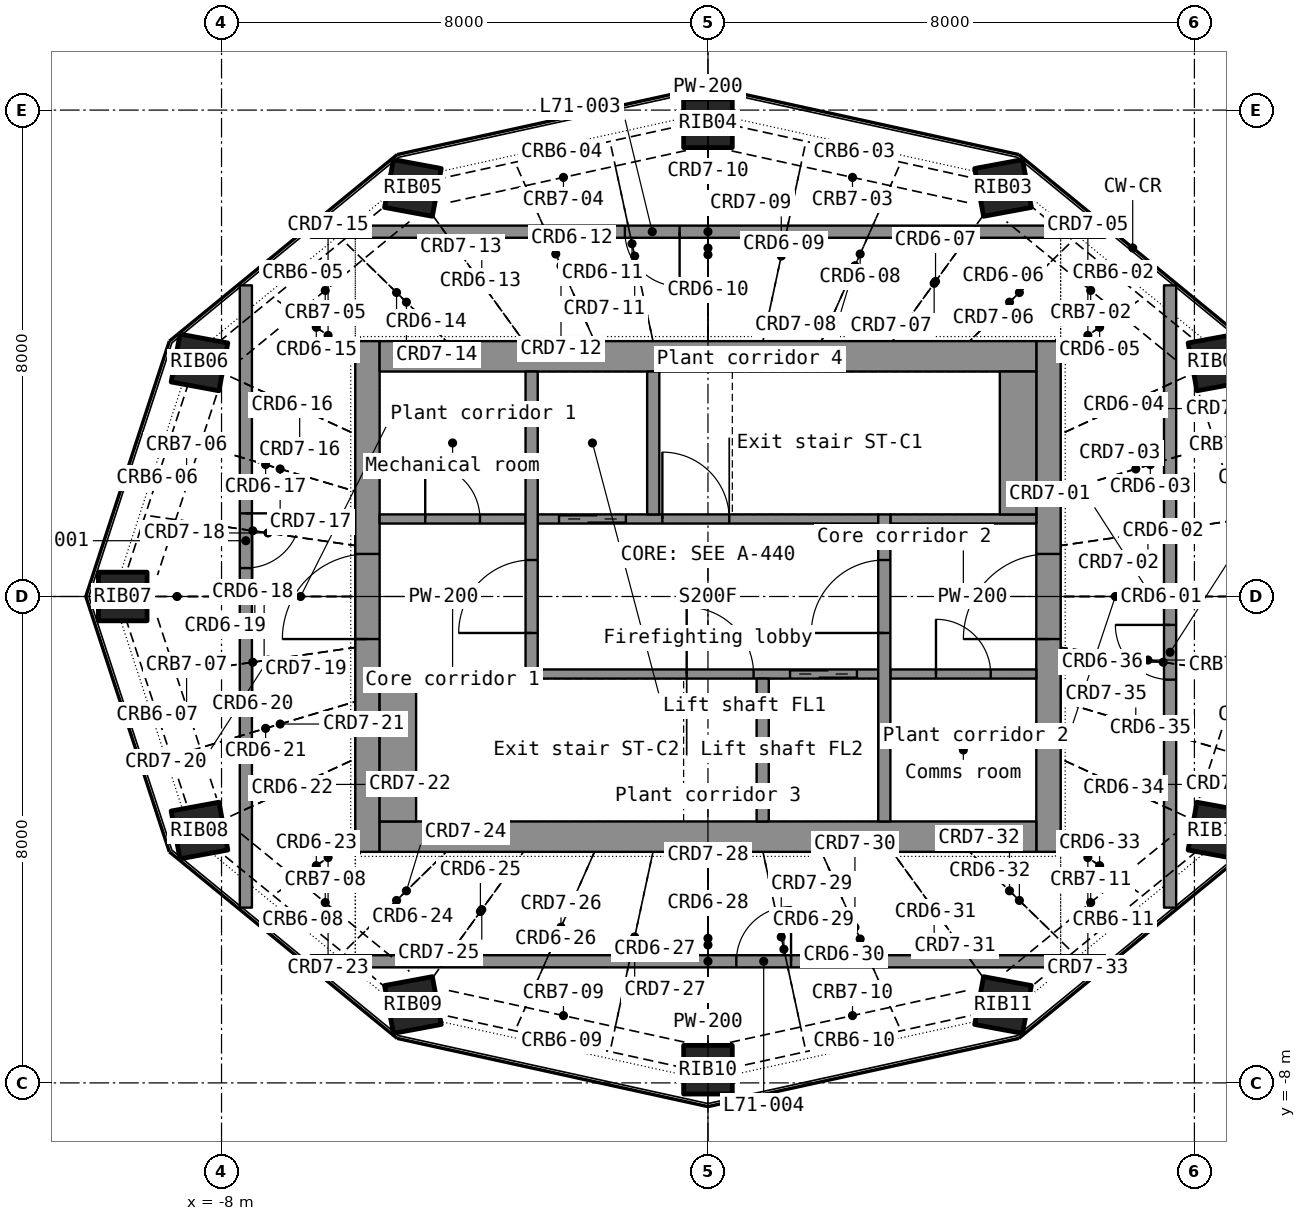
"""IFC4 building model, lengths in metres.
Left out: names, types, materials, properties, quantities, classifications, styles, units other than length and angle.
Written with IfcOpenShell. Run it as: python <this file> out.ifc"""

import sys

from ifc_helpers import new_model, si_unit, direction, frame, frame_2d, origin, origin_2d, place, context, subcontext, project, spatial, rectangle, hollow_rectangle, extrude, element, fill, save


model = new_model("IFC4")
c1 = context("Model", 3, precision=1e-05, world=origin(), true_north=direction((0.0, 1.0)))
c2 = subcontext(c1, "Body", "Model", "MODEL_VIEW")
j1 = project(units=[si_unit("LENGTHUNIT", "METRE"), si_unit("PLANEANGLEUNIT", "RADIAN")], contexts=[c1])
p1 = place(None, origin())
s1 = spatial("IfcSite", under=j1, at=p1, CompositionType="ELEMENT")
p2 = place(p1, origin())
s2 = spatial("IfcBuilding", under=s1, at=p2, CompositionType="ELEMENT")
p3 = place(p2, frame((0.0, 0.0, 292.1)))
s3 = spatial("IfcBuildingStorey", under=s2, at=p3, CompositionType="ELEMENT", Elevation=292.1)
p4 = place(p3, frame((8.362, 3.849, 0.0), z_axis=(-0.119034705, -0.054800649, 0.991376633), x_axis=(0.574755771, -0.817978965, 0.023795301)))
e1 = element("IfcColumn", 1, at=p4, inside=s3, PredefinedType="COLUMN", context=c2, shape_type="SweptSolid", body=[
    extrude(hollow_rectangle(XDim=0.8, YDim=0.8, WallThickness=0.025, at=origin_2d()), origin(), (0.0, 0.0, 1.0), 3.934),
])
p5 = place(p3, frame((4.853, 6.719, 0.0), z_axis=(-0.069187562, -0.095793381, 0.992993811), x_axis=(0.903250872, -0.428569359, 0.021590888)))
e2 = element("IfcColumn", 2, at=p5, inside=s3, PredefinedType="COLUMN", context=c2, shape_type="SweptSolid", body=[
    extrude(hollow_rectangle(XDim=0.8, YDim=0.8, WallThickness=0.025, at=origin_2d()), origin(), (0.0, 0.0, 1.0), 3.927),
])
p6 = place(p3, frame((0.0, 7.783, 0.0), z_axis=(0.0, -0.111052891, 0.993814497), x_axis=(1.0, 0.0, 0.0)))
e3 = element("IfcColumn", 3, at=p6, inside=s3, PredefinedType="COLUMN", context=c2, shape_type="SweptSolid", body=[
    extrude(hollow_rectangle(XDim=0.8, YDim=0.8, WallThickness=0.025, at=origin_2d()), origin(), (0.0, 0.0, 1.0), 3.924),
])
p7 = place(p3, frame((-4.853, 6.719, 0.0), z_axis=(0.069187562, -0.095793381, 0.992993811), x_axis=(0.903250872, 0.428569359, -0.021590888)))
e4 = element("IfcColumn", 4, at=p7, inside=s3, PredefinedType="COLUMN", context=c2, shape_type="SweptSolid", body=[
    extrude(hollow_rectangle(XDim=0.8, YDim=0.8, WallThickness=0.025, at=origin_2d()), origin(), (0.0, 0.0, 1.0), 3.927),
])
p8 = place(p3, frame((-8.362, 3.849, 0.0), z_axis=(0.119034705, -0.054800649, 0.991376633), x_axis=(0.574755771, 0.817978965, -0.023795301)))
e5 = element("IfcColumn", 5, at=p8, inside=s3, PredefinedType="COLUMN", context=c2, shape_type="SweptSolid", body=[
    extrude(hollow_rectangle(XDim=0.8, YDim=0.8, WallThickness=0.025, at=origin_2d()), origin(), (0.0, 0.0, 1.0), 3.934),
])
p9 = place(p3, frame((-9.625, 0.0, 0.0), z_axis=(0.136922778, 0.0, 0.990581725), x_axis=(0.0, 1.0, 0.0)))
e6 = element("IfcColumn", 6, at=p9, inside=s3, PredefinedType="COLUMN", context=c2, shape_type="SweptSolid", body=[
    extrude(hollow_rectangle(XDim=0.8, YDim=0.8, WallThickness=0.025, at=origin_2d()), origin(), (0.0, 0.0, 1.0), 3.937),
])
p10 = place(p3, frame((-8.362, -3.849, 0.0), z_axis=(0.119034705, 0.054800649, 0.991376633), x_axis=(-0.574755771, 0.817978965, 0.023795301)))
e7 = element("IfcColumn", 7, at=p10, inside=s3, PredefinedType="COLUMN", context=c2, shape_type="SweptSolid", body=[
    extrude(hollow_rectangle(XDim=0.8, YDim=0.8, WallThickness=0.025, at=origin_2d()), origin(), (0.0, 0.0, 1.0), 3.934),
])
p11 = place(p3, frame((-4.853, -6.719, 0.0), z_axis=(0.069187562, 0.095793381, 0.992993811), x_axis=(-0.903250872, 0.428569359, 0.021590888)))
e8 = element("IfcColumn", 8, at=p11, inside=s3, PredefinedType="COLUMN", context=c2, shape_type="SweptSolid", body=[
    extrude(hollow_rectangle(XDim=0.8, YDim=0.8, WallThickness=0.025, at=origin_2d()), origin(), (0.0, 0.0, 1.0), 3.927),
])
p12 = place(p3, frame((0.0, -7.783, 0.0), z_axis=(0.0, 0.111052891, 0.993814497), x_axis=(-1.0, 0.0, 0.0)))
e9 = element("IfcColumn", 9, at=p12, inside=s3, PredefinedType="COLUMN", context=c2, shape_type="SweptSolid", body=[
    extrude(hollow_rectangle(XDim=0.8, YDim=0.8, WallThickness=0.025, at=origin_2d()), origin(), (0.0, 0.0, 1.0), 3.924),
])
p13 = place(p3, frame((4.853, -6.719, 0.0), z_axis=(-0.069187562, 0.095793381, 0.992993811), x_axis=(-0.903250872, -0.428569359, -0.021590888)))
e10 = element("IfcColumn", 10, at=p13, inside=s3, PredefinedType="COLUMN", context=c2, shape_type="SweptSolid", body=[
    extrude(hollow_rectangle(XDim=0.8, YDim=0.8, WallThickness=0.025, at=origin_2d()), origin(), (0.0, 0.0, 1.0), 3.927),
])
p14 = place(p3, frame((8.362, -3.849, 0.0), z_axis=(-0.119034705, 0.054800649, 0.991376633), x_axis=(-0.574755771, -0.817978965, -0.023795301)))
e11 = element("IfcColumn", 11, at=p14, inside=s3, PredefinedType="COLUMN", context=c2, shape_type="SweptSolid", body=[
    extrude(hollow_rectangle(XDim=0.8, YDim=0.8, WallThickness=0.025, at=origin_2d()), origin(), (0.0, 0.0, 1.0), 3.934),
])
p15 = place(p3, frame((-5.6, -4.2, 0.0), z_axis=(0.0, 0.0, 1.0), x_axis=(0.0, 1.0, 0.0)))
e12 = element("IfcWall", 12, at=p15, inside=s3, PredefinedType="SHEAR", context=c2, shape_type="SweptSolid", body=[
    extrude(rectangle(XDim=8.4, YDim=0.4, at=frame_2d((4.2, 0.0))), origin(), (0.0, 0.0, 1.0), 3.6),
])
p16 = place(p15, frame((3.5, 0.0, 0.0)))
e13 = element("IfcOpeningElement", 13, at=p16, cuts=e12, PredefinedType="OPENING", context=c2, shape_type="SweptSolid", body=[
    extrude(rectangle(XDim=1.4, YDim=2.2, at=frame_2d((0.7, 1.1))), frame((0.0, 0.21, 0.0), z_axis=(0.0, -1.0, 0.0), x_axis=(1.0, 0.0, 0.0)), (0.0, 0.0, 1.0), 0.42),
])
p17 = place(p3, frame((5.6, -4.2, 0.0), z_axis=(0.0, 0.0, 1.0), x_axis=(0.0, 1.0, 0.0)))
e14 = element("IfcWall", 14, at=p17, inside=s3, PredefinedType="SHEAR", context=c2, shape_type="SweptSolid", body=[
    extrude(rectangle(XDim=8.4, YDim=0.4, at=frame_2d((4.2, 0.0))), origin(), (0.0, 0.0, 1.0), 3.6),
])
p18 = place(p17, frame((3.5, 0.0, 0.0)))
e15 = element("IfcOpeningElement", 15, at=p18, cuts=e14, PredefinedType="OPENING", context=c2, shape_type="SweptSolid", body=[
    extrude(rectangle(XDim=1.4, YDim=2.2, at=frame_2d((0.7, 1.1))), frame((0.0, 0.21, 0.0), z_axis=(0.0, -1.0, 0.0), x_axis=(1.0, 0.0, 0.0)), (0.0, 0.0, 1.0), 0.42),
])
for number, where, z_axis, x_axis in (
    (16, (-5.4, -3.95, 0.0), (0.0, 0.0, 1.0), (1.0, 0.0, 0.0)),
    (17, (-5.4, 3.95, 0.0), (0.0, 0.0, 1.0), (1.0, 0.0, 0.0)),
):
    element("IfcWall", number, at=place(p3, frame(where, z_axis=z_axis, x_axis=x_axis)), inside=s3, PredefinedType="SHEAR", context=c2, shape_type="SweptSolid", body=[
        extrude(rectangle(XDim=10.8, YDim=0.5, at=frame_2d((5.4, 0.0))), origin(), (0.0, 0.0, 1.0), 3.6),
    ])
p19 = place(p3, frame((-5.4, -1.275, 0.0), z_axis=(0.0, 0.0, 1.0), x_axis=(1.0, 0.0, 0.0)))
e18 = element("IfcWall", 18, at=p19, inside=s3, PredefinedType="SHEAR", context=c2, shape_type="SweptSolid", body=[
    extrude(rectangle(XDim=2.4, YDim=0.15, at=frame_2d((1.2, 0.0))), origin(), (0.0, 0.0, 1.0), 3.6),
])
p20 = place(p3, frame((-2.8, -1.275, 0.0), z_axis=(0.0, 0.0, 1.0), x_axis=(1.0, 0.0, 0.0)))
e19 = element("IfcWall", 19, at=p20, inside=s3, PredefinedType="SHEAR", context=c2, shape_type="SweptSolid", body=[
    extrude(rectangle(XDim=5.6, YDim=0.15, at=frame_2d((2.8, 0.0))), origin(), (0.0, 0.0, 1.0), 3.6),
])
p21 = place(p20, frame((4.15, 0.0, 0.0)))
e20 = element("IfcOpeningElement", 20, at=p21, cuts=e19, PredefinedType="OPENING", context=c2, shape_type="SweptSolid", body=[
    extrude(rectangle(XDim=1.1, YDim=2.2, at=frame_2d((0.55, 1.1))), frame((0.0, 0.085, 0.0), z_axis=(0.0, -1.0, 0.0), x_axis=(1.0, 0.0, 0.0)), (0.0, 0.0, 1.0), 0.17),
])
p22 = place(p20, frame((2.45, 0.0, 0.0)))
e21 = element("IfcOpeningElement", 21, at=p22, cuts=e19, PredefinedType="OPENING", context=c2, shape_type="SweptSolid", body=[
    extrude(rectangle(XDim=1.1, YDim=2.15, at=frame_2d((0.55, 1.075))), frame((0.0, 0.085, 0.0), z_axis=(0.0, -1.0, 0.0), x_axis=(1.0, 0.0, 0.0)), (0.0, 0.0, 1.0), 0.17),
])
p23 = place(p3, frame((3.0, -1.275, 0.0), z_axis=(0.0, 0.0, 1.0), x_axis=(1.0, 0.0, 0.0)))
e22 = element("IfcWall", 22, at=p23, inside=s3, PredefinedType="PARTITIONING", context=c2, shape_type="SweptSolid", body=[
    extrude(rectangle(XDim=2.4, YDim=0.15, at=frame_2d((1.2, 0.0))), origin(), (0.0, 0.0, 1.0), 3.6),
])
p24 = place(p23, frame((0.75, 0.0, 0.0)))
e23 = element("IfcOpeningElement", 23, at=p24, cuts=e22, PredefinedType="OPENING", context=c2, shape_type="SweptSolid", body=[
    extrude(rectangle(XDim=0.9, YDim=2.1, at=frame_2d((0.45, 1.05))), frame((0.0, 0.085, 0.0), z_axis=(0.0, -1.0, 0.0), x_axis=(1.0, 0.0, 0.0)), (0.0, 0.0, 1.0), 0.17),
])
p25 = place(p3, frame((-5.4, 1.275, 0.0), z_axis=(0.0, 0.0, 1.0), x_axis=(1.0, 0.0, 0.0)))
e24 = element("IfcWall", 24, at=p25, inside=s3, PredefinedType="PARTITIONING", context=c2, shape_type="SweptSolid", body=[
    extrude(rectangle(XDim=2.4, YDim=0.15, at=frame_2d((1.2, 0.0))), origin(), (0.0, 0.0, 1.0), 3.6),
])
p26 = place(p25, frame((0.75, 0.0, 0.0)))
e25 = element("IfcOpeningElement", 25, at=p26, cuts=e24, PredefinedType="OPENING", context=c2, shape_type="SweptSolid", body=[
    extrude(rectangle(XDim=0.9, YDim=2.1, at=frame_2d((0.45, 1.05))), frame((0.0, 0.085, 0.0), z_axis=(0.0, -1.0, 0.0), x_axis=(1.0, 0.0, 0.0)), (0.0, 0.0, 1.0), 0.17),
])
p27 = place(p3, frame((-2.8, 1.275, 0.0), z_axis=(0.0, 0.0, 1.0), x_axis=(1.0, 0.0, 0.0)))
e26 = element("IfcWall", 26, at=p27, inside=s3, PredefinedType="SHEAR", context=c2, shape_type="SweptSolid", body=[
    extrude(rectangle(XDim=5.6, YDim=0.15, at=frame_2d((2.8, 0.0))), origin(), (0.0, 0.0, 1.0), 3.6),
])
p28 = place(p27, frame((0.35, 0.0, 0.0)))
e27 = element("IfcOpeningElement", 27, at=p28, cuts=e26, PredefinedType="OPENING", context=c2, shape_type="SweptSolid", body=[
    extrude(rectangle(XDim=1.1, YDim=2.2, at=frame_2d((0.55, 1.1))), frame((0.0, 0.085, 0.0), z_axis=(0.0, -1.0, 0.0), x_axis=(1.0, 0.0, 0.0)), (0.0, 0.0, 1.0), 0.17),
])
p29 = place(p27, frame((2.05, 0.0, 0.0)))
e28 = element("IfcOpeningElement", 28, at=p29, cuts=e26, PredefinedType="OPENING", context=c2, shape_type="SweptSolid", body=[
    extrude(rectangle(XDim=1.1, YDim=2.15, at=frame_2d((0.55, 1.075))), frame((0.0, 0.085, 0.0), z_axis=(0.0, -1.0, 0.0), x_axis=(1.0, 0.0, 0.0)), (0.0, 0.0, 1.0), 0.17),
])
p30 = place(p3, frame((3.0, 1.275, 0.0), z_axis=(0.0, 0.0, 1.0), x_axis=(1.0, 0.0, 0.0)))
e29 = element("IfcWall", 29, at=p30, inside=s3, PredefinedType="SHEAR", context=c2, shape_type="SweptSolid", body=[
    extrude(rectangle(XDim=2.4, YDim=0.15, at=frame_2d((1.2, 0.0))), origin(), (0.0, 0.0, 1.0), 3.6),
])
p31 = place(p3, frame((-2.9, -1.35, 0.0), z_axis=(0.0, 0.0, 1.0), x_axis=(0.0, 1.0, 0.0)))
e30 = element("IfcWall", 30, at=p31, inside=s3, PredefinedType="SHEAR", context=c2, shape_type="SweptSolid", body=[
    extrude(rectangle(XDim=5.05, YDim=0.2, at=frame_2d((2.525, 0.0))), origin(), (0.0, 0.0, 1.0), 3.6),
])
p32 = place(p31, frame((0.75, 0.0, 0.0)))
e31 = element("IfcOpeningElement", 31, at=p32, cuts=e30, PredefinedType="OPENING", context=c2, shape_type="SweptSolid", body=[
    extrude(rectangle(XDim=1.2, YDim=2.2, at=frame_2d((0.6, 1.1))), frame((0.0, 0.11, 0.0), z_axis=(0.0, -1.0, 0.0), x_axis=(1.0, 0.0, 0.0)), (0.0, 0.0, 1.0), 0.22),
])
p33 = place(p3, frame((2.9, -3.7, 0.0), z_axis=(0.0, 0.0, 1.0), x_axis=(0.0, 1.0, 0.0)))
e32 = element("IfcWall", 32, at=p33, inside=s3, PredefinedType="SHEAR", context=c2, shape_type="SweptSolid", body=[
    extrude(rectangle(XDim=5.05, YDim=0.2, at=frame_2d((2.525, 0.0))), origin(), (0.0, 0.0, 1.0), 3.6),
])
p34 = place(p33, frame((3.1, 0.0, 0.0)))
e33 = element("IfcOpeningElement", 33, at=p34, cuts=e32, PredefinedType="OPENING", context=c2, shape_type="SweptSolid", body=[
    extrude(rectangle(XDim=1.2, YDim=2.2, at=frame_2d((0.6, 1.1))), frame((0.0, 0.11, 0.0), z_axis=(0.0, -1.0, 0.0), x_axis=(1.0, 0.0, 0.0)), (0.0, 0.0, 1.0), 0.22),
])
for number, where, z_axis, x_axis in (
    (34, (-0.9, 1.35, 0.0), (0.0, 0.0, 1.0), (0.0, 1.0, 0.0)),
    (35, (0.9, -3.7, 0.0), (0.0, 0.0, 1.0), (0.0, 1.0, 0.0)),
):
    element("IfcWall", number, at=place(p3, frame(where, z_axis=z_axis, x_axis=x_axis)), inside=s3, PredefinedType="SHEAR", context=c2, shape_type="SweptSolid", body=[
        extrude(rectangle(XDim=2.35, YDim=0.2, at=frame_2d((1.175, 0.0))), origin(), (0.0, 0.0, 1.0), 3.6),
    ])
for number, where, z_axis, x_axis in (
    (36, (5.1, 1.35, 0.0), (0.0, 0.0, 1.0), (0.0, 1.0, 0.0)),
    (37, (-5.1, -3.7, 0.0), (0.0, 0.0, 1.0), (0.0, 1.0, 0.0)),
):
    element("IfcWall", number, at=place(p3, frame(where, z_axis=z_axis, x_axis=x_axis)), inside=s3, PredefinedType="SHEAR", context=c2, shape_type="SweptSolid", body=[
        extrude(rectangle(XDim=2.35, YDim=0.6, at=frame_2d((1.175, 0.0))), origin(), (0.0, 0.0, 1.0), 3.6),
    ])
p35 = place(p3, frame((-6.534, -6.0, 0.0), z_axis=(0.0, 0.0, 1.0), x_axis=(1.0, 0.0, 0.0)))
e38 = element("IfcWall", 38, at=p35, inside=s3, PredefinedType="PARTITIONING", context=c2, shape_type="SweptSolid", body=[
    extrude(rectangle(XDim=13.067, YDim=0.2, at=frame_2d((6.534, 0.0))), origin(), (0.0, 0.0, 1.0), 2.9),
])
p36 = place(p35, frame((7.0, 0.0, 0.0)))
e39 = element("IfcOpeningElement", 39, at=p36, cuts=e38, PredefinedType="OPENING", context=c2, shape_type="SweptSolid", body=[
    extrude(rectangle(XDim=0.9, YDim=2.1, at=frame_2d((0.45, 1.05))), frame((0.0, 0.11, 0.0), z_axis=(0.0, -1.0, 0.0), x_axis=(1.0, 0.0, 0.0)), (0.0, 0.0, 1.0), 0.22),
])
p37 = place(p3, frame((6.534, 6.0, 0.0), z_axis=(0.0, 0.0, 1.0), x_axis=(-1.0, 0.0, 0.0)))
e40 = element("IfcWall", 40, at=p37, inside=s3, PredefinedType="PARTITIONING", context=c2, shape_type="SweptSolid", body=[
    extrude(rectangle(XDim=13.067, YDim=0.2, at=frame_2d((6.534, 0.0))), origin(), (0.0, 0.0, 1.0), 2.9),
])
p38 = place(p37, frame((7.0, 0.0, 0.0)))
e41 = element("IfcOpeningElement", 41, at=p38, cuts=e40, PredefinedType="OPENING", context=c2, shape_type="SweptSolid", body=[
    extrude(rectangle(XDim=0.9, YDim=2.1, at=frame_2d((0.45, 1.05))), frame((0.0, 0.11, 0.0), z_axis=(0.0, -1.0, 0.0), x_axis=(1.0, 0.0, 0.0)), (0.0, 0.0, 1.0), 0.22),
])
p39 = place(p3, frame((7.6, -5.117, 0.0), z_axis=(0.0, 0.0, 1.0), x_axis=(0.0, 1.0, 0.0)))
e42 = element("IfcWall", 42, at=p39, inside=s3, PredefinedType="PARTITIONING", context=c2, shape_type="SweptSolid", body=[
    extrude(rectangle(XDim=10.235, YDim=0.2, at=frame_2d((5.117, 0.0))), origin(), (0.0, 0.0, 1.0), 2.9),
])
p40 = place(p39, frame((3.75, 0.0, 0.0)))
e43 = element("IfcOpeningElement", 43, at=p40, cuts=e42, PredefinedType="OPENING", context=c2, shape_type="SweptSolid", body=[
    extrude(rectangle(XDim=0.9, YDim=2.1, at=frame_2d((0.45, 1.05))), frame((0.0, 0.11, 0.0), z_axis=(0.0, -1.0, 0.0), x_axis=(1.0, 0.0, 0.0)), (0.0, 0.0, 1.0), 0.22),
])
p41 = place(p3, frame((-7.6, 5.117, 0.0), z_axis=(0.0, 0.0, 1.0), x_axis=(0.0, -1.0, 0.0)))
e44 = element("IfcWall", 44, at=p41, inside=s3, PredefinedType="PARTITIONING", context=c2, shape_type="SweptSolid", body=[
    extrude(rectangle(XDim=10.235, YDim=0.2, at=frame_2d((5.117, 0.0))), origin(), (0.0, 0.0, 1.0), 2.9),
])
p42 = place(p41, frame((3.75, 0.0, 0.0)))
e45 = element("IfcOpeningElement", 45, at=p42, cuts=e44, PredefinedType="OPENING", context=c2, shape_type="SweptSolid", body=[
    extrude(rectangle(XDim=0.9, YDim=2.1, at=frame_2d((0.45, 1.05))), frame((0.0, 0.11, 0.0), z_axis=(0.0, -1.0, 0.0), x_axis=(1.0, 0.0, 0.0)), (0.0, 0.0, 1.0), 0.22),
])
p43 = place(p16, origin())
e46 = element("IfcDoor", 46, at=p43, inside=s3, OperationType="DOUBLE_DOOR_SINGLE_SWING", PredefinedType="DOOR", context=c2, shape_type="SweptSolid", body=[
    extrude(rectangle(XDim=1.4, YDim=2.2, at=frame_2d((0.7, 1.1))), frame((0.0, 0.025, 0.0), z_axis=(0.0, -1.0, 0.0), x_axis=(1.0, 0.0, 0.0)), (0.0, 0.0, 1.0), 0.05),
])
fill(e13, e46)
p44 = place(p18, origin())
e47 = element("IfcDoor", 47, at=p44, inside=s3, OperationType="DOUBLE_DOOR_SINGLE_SWING", PredefinedType="DOOR", context=c2, shape_type="SweptSolid", body=[
    extrude(rectangle(XDim=1.4, YDim=2.2, at=frame_2d((0.7, 1.1))), frame((0.0, 0.025, 0.0), z_axis=(0.0, -1.0, 0.0), x_axis=(1.0, 0.0, 0.0)), (0.0, 0.0, 1.0), 0.05),
])
fill(e15, e47)
p45 = place(p32, origin())
e48 = element("IfcDoor", 48, at=p45, inside=s3, OperationType="SINGLE_SWING_LEFT", PredefinedType="DOOR", context=c2, shape_type="SweptSolid", body=[
    extrude(rectangle(XDim=1.2, YDim=2.2, at=frame_2d((0.6, 1.1))), frame((0.0, 0.025, 0.0), z_axis=(0.0, -1.0, 0.0), x_axis=(1.0, 0.0, 0.0)), (0.0, 0.0, 1.0), 0.05),
])
fill(e31, e48)
p46 = place(p34, origin())
e49 = element("IfcDoor", 49, at=p46, inside=s3, OperationType="SINGLE_SWING_LEFT", PredefinedType="DOOR", context=c2, shape_type="SweptSolid", body=[
    extrude(rectangle(XDim=1.2, YDim=2.2, at=frame_2d((0.6, 1.1))), frame((0.0, 0.025, 0.0), z_axis=(0.0, -1.0, 0.0), x_axis=(1.0, 0.0, 0.0)), (0.0, 0.0, 1.0), 0.05),
])
fill(e33, e49)
p47 = place(p28, origin())
e50 = element("IfcDoor", 50, at=p47, inside=s3, OperationType="DOUBLE_DOOR_SLIDING", PredefinedType="DOOR", context=c2, shape_type="SweptSolid", body=[
    extrude(rectangle(XDim=1.1, YDim=2.2, at=frame_2d((0.55, 1.1))), frame((0.0, 0.025, 0.0), z_axis=(0.0, -1.0, 0.0), x_axis=(1.0, 0.0, 0.0)), (0.0, 0.0, 1.0), 0.05),
])
fill(e27, e50)
p48 = place(p21, origin())
e51 = element("IfcDoor", 51, at=p48, inside=s3, OperationType="DOUBLE_DOOR_SLIDING", PredefinedType="DOOR", context=c2, shape_type="SweptSolid", body=[
    extrude(rectangle(XDim=1.1, YDim=2.2, at=frame_2d((0.55, 1.1))), frame((0.0, 0.025, 0.0), z_axis=(0.0, -1.0, 0.0), x_axis=(1.0, 0.0, 0.0)), (0.0, 0.0, 1.0), 0.05),
])
fill(e20, e51)
p49 = place(p29, origin())
e52 = element("IfcDoor", 52, at=p49, inside=s3, OperationType="SINGLE_SWING_LEFT", PredefinedType="DOOR", context=c2, shape_type="SweptSolid", body=[
    extrude(rectangle(XDim=1.1, YDim=2.15, at=frame_2d((0.55, 1.075))), frame((0.0, 0.025, 0.0), z_axis=(0.0, -1.0, 0.0), x_axis=(1.0, 0.0, 0.0)), (0.0, 0.0, 1.0), 0.05),
])
fill(e28, e52)
p50 = place(p22, origin())
e53 = element("IfcDoor", 53, at=p50, inside=s3, OperationType="SINGLE_SWING_LEFT", PredefinedType="DOOR", context=c2, shape_type="SweptSolid", body=[
    extrude(rectangle(XDim=1.1, YDim=2.15, at=frame_2d((0.55, 1.075))), frame((0.0, 0.025, 0.0), z_axis=(0.0, -1.0, 0.0), x_axis=(1.0, 0.0, 0.0)), (0.0, 0.0, 1.0), 0.05),
])
fill(e21, e53)
p51 = place(p26, origin())
e54 = element("IfcDoor", 54, at=p51, inside=s3, OperationType="SINGLE_SWING_LEFT", PredefinedType="DOOR", context=c2, shape_type="SweptSolid", body=[
    extrude(rectangle(XDim=0.9, YDim=2.1, at=frame_2d((0.45, 1.05))), frame((0.0, 0.025, 0.0), z_axis=(0.0, -1.0, 0.0), x_axis=(1.0, 0.0, 0.0)), (0.0, 0.0, 1.0), 0.05),
])
fill(e25, e54)
p52 = place(p24, origin())
e55 = element("IfcDoor", 55, at=p52, inside=s3, OperationType="SINGLE_SWING_LEFT", PredefinedType="DOOR", context=c2, shape_type="SweptSolid", body=[
    extrude(rectangle(XDim=0.9, YDim=2.1, at=frame_2d((0.45, 1.05))), frame((0.0, 0.025, 0.0), z_axis=(0.0, -1.0, 0.0), x_axis=(1.0, 0.0, 0.0)), (0.0, 0.0, 1.0), 0.05),
])
fill(e23, e55)
p53 = place(p42, origin())
e56 = element("IfcDoor", 56, at=p53, inside=s3, OperationType="SINGLE_SWING_LEFT", PredefinedType="DOOR", context=c2, shape_type="SweptSolid", body=[
    extrude(rectangle(XDim=0.9, YDim=2.1, at=frame_2d((0.45, 1.05))), frame((0.0, 0.025, 0.0), z_axis=(0.0, -1.0, 0.0), x_axis=(1.0, 0.0, 0.0)), (0.0, 0.0, 1.0), 0.05),
])
fill(e45, e56)
p54 = place(p40, origin())
e57 = element("IfcDoor", 57, at=p54, inside=s3, OperationType="SINGLE_SWING_RIGHT", PredefinedType="DOOR", context=c2, shape_type="SweptSolid", body=[
    extrude(rectangle(XDim=0.9, YDim=2.1, at=frame_2d((0.45, 1.05))), frame((0.0, 0.025, 0.0), z_axis=(0.0, -1.0, 0.0), x_axis=(1.0, 0.0, 0.0)), (0.0, 0.0, 1.0), 0.05),
])
fill(e43, e57)
p55 = place(p38, origin())
e58 = element("IfcDoor", 58, at=p55, inside=s3, OperationType="SINGLE_SWING_LEFT", PredefinedType="DOOR", context=c2, shape_type="SweptSolid", body=[
    extrude(rectangle(XDim=0.9, YDim=2.1, at=frame_2d((0.45, 1.05))), frame((0.0, 0.025, 0.0), z_axis=(0.0, -1.0, 0.0), x_axis=(1.0, 0.0, 0.0)), (0.0, 0.0, 1.0), 0.05),
])
fill(e41, e58)
p56 = place(p36, origin())
e59 = element("IfcDoor", 59, at=p56, inside=s3, OperationType="SINGLE_SWING_RIGHT", PredefinedType="DOOR", context=c2, shape_type="SweptSolid", body=[
    extrude(rectangle(XDim=0.9, YDim=2.1, at=frame_2d((0.45, 1.05))), frame((0.0, 0.025, 0.0), z_axis=(0.0, -1.0, 0.0), x_axis=(1.0, 0.0, 0.0)), (0.0, 0.0, 1.0), 0.05),
])
fill(e39, e59)
save(model, sys.argv[1])
